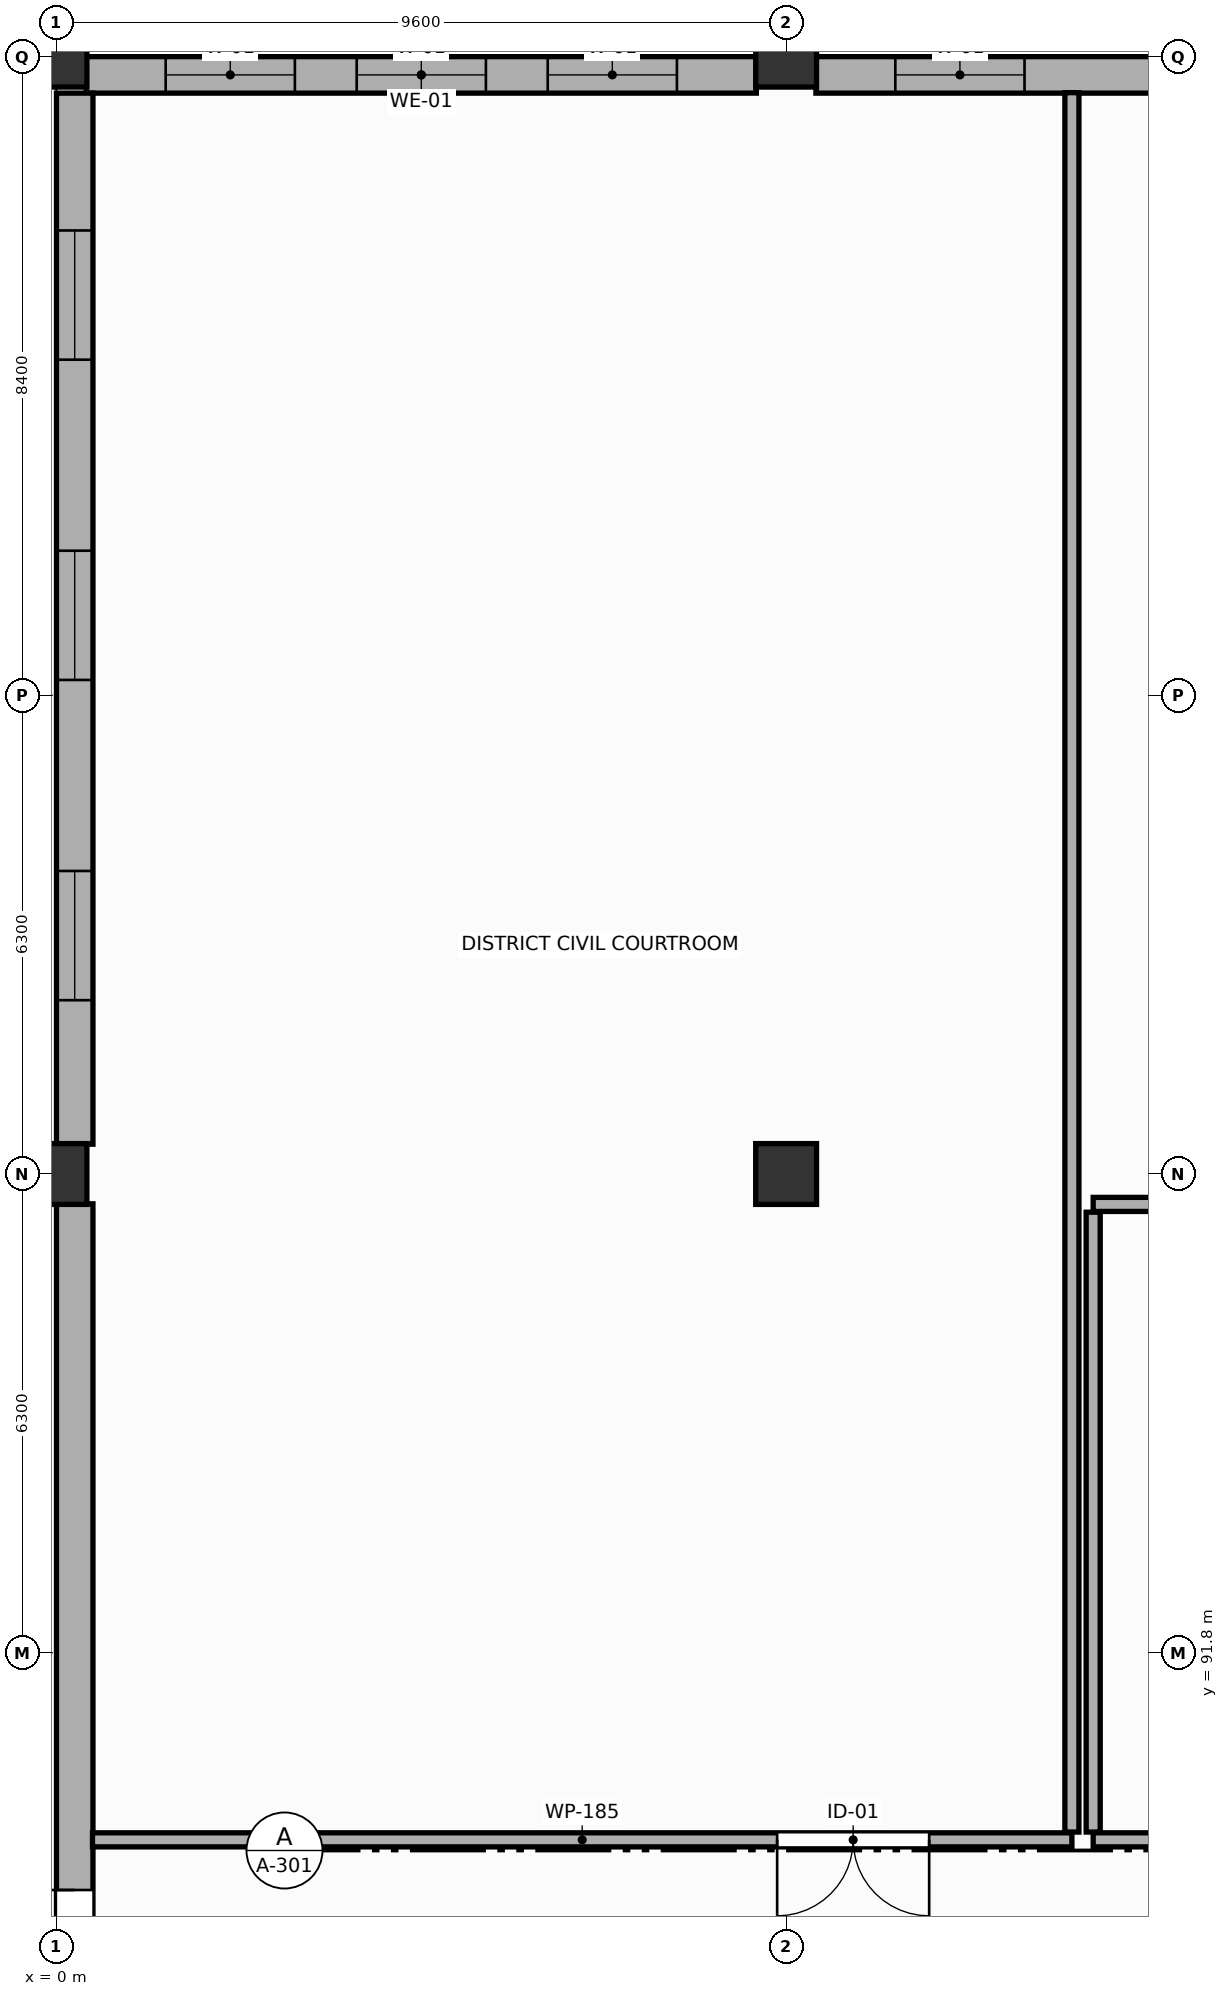
"""IFC4 building model, lengths in metres.
Left out: names, types, materials, properties, quantities, classifications, styles, units other than length and angle.
Written with IfcOpenShell. Run it as: python <this file> out.ifc"""

import sys

from ifc_helpers import new_model, si_unit, direction, frame, frame_2d, origin, origin_2d, place, context, subcontext, project, spatial, rectangle, extrude, element, fill, save


model = new_model("IFC4")
c1 = context("Model", 3, precision=1e-05, world=origin(), true_north=direction((0.0, 1.0)))
c2 = subcontext(c1, "Body", "Model", "MODEL_VIEW")
j1 = project(units=[si_unit("LENGTHUNIT", "METRE"), si_unit("PLANEANGLEUNIT", "RADIAN")], contexts=[c1])
p1 = place(None, origin())
s1 = spatial("IfcSite", under=j1, at=p1, CompositionType="ELEMENT")
p2 = place(p1, origin())
s2 = spatial("IfcBuilding", under=s1, at=p2, CompositionType="ELEMENT")
p3 = place(p2, origin())
s3 = spatial("IfcBuildingStorey", under=s2, at=p3, CompositionType="ELEMENT", Elevation=0.0)
for number, where, z_axis, x_axis in (
    (1, (0.0, 98.1, 0.0), (0.0, 0.0, 1.0), (1.0, 0.0, 0.0)),
    (2, (0.0, 112.8, 0.0), (0.0, 0.0, 1.0), (1.0, 0.0, 0.0)),
    (3, (9.6, 98.1, 0.0), (0.0, 0.0, 1.0), (1.0, 0.0, 0.0)),
    (4, (9.6, 112.8, 0.0), (0.0, 0.0, 1.0), (1.0, 0.0, 0.0)),
):
    element("IfcColumn", number, at=place(p3, frame(where, z_axis=z_axis, x_axis=x_axis)), inside=s3, PredefinedType="COLUMN", context=c2, shape_type="SweptSolid", body=[
        extrude(rectangle(XDim=0.8, YDim=0.8, at=origin_2d()), origin(), (0.0, 0.0, 1.0), 5.4),
    ])
p4 = place(p3, frame((0.392, 112.56, 0.0), z_axis=(0.0, 0.0, 1.0), x_axis=(1.0, 0.0, 0.0)))
e5 = element("IfcWall", 5, at=p4, inside=s3, PredefinedType="STANDARD", context=c2, shape_type="SweptSolid", body=[
    extrude(rectangle(XDim=8.816, YDim=0.48, at=frame_2d((4.408, 0.0))), origin(), (0.0, 0.0, 1.0), 4.18),
])
p5 = place(p4, frame((1.045, 0.0, 0.85)))
e6 = element("IfcOpeningElement", 6, at=p5, cuts=e5, PredefinedType="OPENING", context=c2, shape_type="SweptSolid", body=[
    extrude(rectangle(XDim=1.7, YDim=2.3, at=frame_2d((0.85, 1.15))), frame((0.0, 0.25, 0.0), z_axis=(0.0, -1.0, 0.0), x_axis=(1.0, 0.0, 0.0)), (0.0, 0.0, 1.0), 0.5),
])
p6 = place(p4, frame((3.558, 0.0, 0.85)))
e7 = element("IfcOpeningElement", 7, at=p6, cuts=e5, PredefinedType="OPENING", context=c2, shape_type="SweptSolid", body=[
    extrude(rectangle(XDim=1.7, YDim=2.3, at=frame_2d((0.85, 1.15))), frame((0.0, 0.25, 0.0), z_axis=(0.0, -1.0, 0.0), x_axis=(1.0, 0.0, 0.0)), (0.0, 0.0, 1.0), 0.5),
])
p7 = place(p4, frame((6.071, 0.0, 0.85)))
e8 = element("IfcOpeningElement", 8, at=p7, cuts=e5, PredefinedType="OPENING", context=c2, shape_type="SweptSolid", body=[
    extrude(rectangle(XDim=1.7, YDim=2.3, at=frame_2d((0.85, 1.15))), frame((0.0, 0.25, 0.0), z_axis=(0.0, -1.0, 0.0), x_axis=(1.0, 0.0, 0.0)), (0.0, 0.0, 1.0), 0.5),
])
p8 = place(p3, frame((9.992, 112.56, 0.0), z_axis=(0.0, 0.0, 1.0), x_axis=(1.0, 0.0, 0.0)))
e9 = element("IfcWall", 9, at=p8, inside=s3, PredefinedType="STANDARD", context=c2, shape_type="SweptSolid", body=[
    extrude(rectangle(XDim=8.821, YDim=0.48, at=frame_2d((4.411, 0.0))), origin(), (0.0, 0.0, 1.0), 4.18),
])
p9 = place(p8, frame((1.045, 0.0, 0.85)))
e10 = element("IfcOpeningElement", 10, at=p9, cuts=e9, PredefinedType="OPENING", context=c2, shape_type="SweptSolid", body=[
    extrude(rectangle(XDim=1.7, YDim=2.3, at=frame_2d((0.85, 1.15))), frame((0.0, 0.25, 0.0), z_axis=(0.0, -1.0, 0.0), x_axis=(1.0, 0.0, 0.0)), (0.0, 0.0, 1.0), 0.5),
])
p10 = place(p8, frame((6.071, 0.0, 0.85)))
e11 = element("IfcOpeningElement", 11, at=p10, cuts=e9, PredefinedType="OPENING", context=c2, shape_type="SweptSolid", body=[
    extrude(rectangle(XDim=1.7, YDim=2.3, at=frame_2d((0.85, 1.15))), frame((0.0, 0.25, 0.0), z_axis=(0.0, -1.0, 0.0), x_axis=(1.0, 0.0, 0.0)), (0.0, 0.0, 1.0), 0.5),
])
p11 = place(p3, frame((0.24, 85.892, 0.0), z_axis=(0.0, 0.0, 1.0), x_axis=(0.0, 1.0, 0.0)))
e12 = element("IfcWall", 12, at=p11, inside=s3, PredefinedType="STANDARD", context=c2, shape_type="SweptSolid", body=[
    extrude(rectangle(XDim=11.816, YDim=0.48, at=frame_2d((5.908, 0.0))), origin(), (0.0, 0.0, 1.0), 4.18),
])
p12 = place(p11, frame((0.988, 0.0, 0.0)))
e13 = element("IfcOpeningElement", 13, at=p12, cuts=e12, PredefinedType="OPENING", context=c2, shape_type="SweptSolid", body=[
    extrude(rectangle(XDim=1.8, YDim=2.25, at=frame_2d((0.9, 1.125))), frame((0.0, 0.25, 0.0), z_axis=(0.0, -1.0, 0.0), x_axis=(1.0, 0.0, 0.0)), (0.0, 0.0, 1.0), 0.5),
])
p13 = place(p3, frame((0.24, 98.492, 0.0), z_axis=(0.0, 0.0, 1.0), x_axis=(0.0, 1.0, 0.0)))
e14 = element("IfcWall", 14, at=p13, inside=s3, PredefinedType="STANDARD", context=c2, shape_type="SweptSolid", body=[
    extrude(rectangle(XDim=13.828, YDim=0.48, at=frame_2d((6.914, 0.0))), origin(), (0.0, 0.0, 1.0), 4.18),
])
p14 = place(p13, frame((1.895, 0.0, 0.85)))
e15 = element("IfcOpeningElement", 15, at=p14, cuts=e14, PredefinedType="OPENING", context=c2, shape_type="SweptSolid", body=[
    extrude(rectangle(XDim=1.7, YDim=2.3, at=frame_2d((0.85, 1.15))), frame((0.0, 0.25, 0.0), z_axis=(0.0, -1.0, 0.0), x_axis=(1.0, 0.0, 0.0)), (0.0, 0.0, 1.0), 0.5),
])
p15 = place(p13, frame((6.108, 0.0, 0.85)))
e16 = element("IfcOpeningElement", 16, at=p15, cuts=e14, PredefinedType="OPENING", context=c2, shape_type="SweptSolid", body=[
    extrude(rectangle(XDim=1.7, YDim=2.3, at=frame_2d((0.85, 1.15))), frame((0.0, 0.25, 0.0), z_axis=(0.0, -1.0, 0.0), x_axis=(1.0, 0.0, 0.0)), (0.0, 0.0, 1.0), 0.5),
])
p16 = place(p13, frame((10.321, 0.0, 0.85)))
e17 = element("IfcOpeningElement", 17, at=p16, cuts=e14, PredefinedType="OPENING", context=c2, shape_type="SweptSolid", body=[
    extrude(rectangle(XDim=1.7, YDim=2.3, at=frame_2d((0.85, 1.15))), frame((0.0, 0.25, 0.0), z_axis=(0.0, -1.0, 0.0), x_axis=(1.0, 0.0, 0.0)), (0.0, 0.0, 1.0), 0.5),
])
p17 = place(p3, frame((13.36, 89.34, 0.0), z_axis=(0.0, 0.0, 1.0), x_axis=(-1.0, 0.0, 0.0)))
e18 = element("IfcWall", 18, at=p17, inside=s3, PredefinedType="PARTITIONING", context=c2, shape_type="SweptSolid", body=[
    extrude(rectangle(XDim=12.886, YDim=0.185, at=frame_2d((6.443, 0.0))), origin(), (0.0, 0.0, 1.0), 4.23),
])
p18 = place(p17, frame((1.878, 0.0, 0.0)))
e19 = element("IfcOpeningElement", 19, at=p18, cuts=e18, PredefinedType="OPENING", context=c2, shape_type="SweptSolid", body=[
    extrude(rectangle(XDim=2.0, YDim=2.5, at=frame_2d((1.0, 1.25))), frame((0.0, 0.103, 0.0), z_axis=(0.0, -1.0, 0.0), x_axis=(1.0, 0.0, 0.0)), (0.0, 0.0, 1.0), 0.205),
])
p19 = place(p3, frame((13.36, 112.326, 0.0), z_axis=(0.0, 0.0, 1.0), x_axis=(0.0, -1.0, 0.0)))
e20 = element("IfcWall", 20, at=p19, inside=s3, PredefinedType="PARTITIONING", context=c2, shape_type="SweptSolid", body=[
    extrude(rectangle(XDim=22.884, YDim=0.185, at=frame_2d((11.442, 0.0))), origin(), (0.0, 0.0, 1.0), 4.33),
])
p20 = place(p3, frame((13.64, 97.7, 0.0), z_axis=(0.0, 0.0, 1.0), x_axis=(1.0, 0.0, 0.0)))
e21 = element("IfcWall", 21, at=p20, inside=s3, PredefinedType="PARTITIONING", context=c2, shape_type="SweptSolid", body=[
    extrude(rectangle(XDim=12.42, YDim=0.185, at=frame_2d((6.21, 0.0))), origin(), (0.0, 0.0, 1.0), 4.18),
])
p21 = place(p3, frame((26.06, 89.34, 0.0), z_axis=(0.0, 0.0, 1.0), x_axis=(-1.0, 0.0, 0.0)))
e22 = element("IfcWall", 22, at=p21, inside=s3, PredefinedType="PARTITIONING", context=c2, shape_type="SweptSolid", body=[
    extrude(rectangle(XDim=12.42, YDim=0.185, at=frame_2d((6.21, 0.0))), origin(), (0.0, 0.0, 1.0), 4.23),
])
p22 = place(p21, frame((1.808, 0.0, 0.0)))
e23 = element("IfcOpeningElement", 23, at=p22, cuts=e22, PredefinedType="OPENING", context=c2, shape_type="SweptSolid", body=[
    extrude(rectangle(XDim=2.0, YDim=2.5, at=frame_2d((1.0, 1.25))), frame((0.0, 0.103, 0.0), z_axis=(0.0, -1.0, 0.0), x_axis=(1.0, 0.0, 0.0)), (0.0, 0.0, 1.0), 0.205),
])
p23 = place(p3, frame((13.64, 89.442, 0.0), z_axis=(0.0, 0.0, 1.0), x_axis=(0.0, 1.0, 0.0)))
e24 = element("IfcWall", 24, at=p23, inside=s3, PredefinedType="PARTITIONING", context=c2, shape_type="SweptSolid", body=[
    extrude(rectangle(XDim=8.155, YDim=0.185, at=frame_2d((4.078, 0.0))), origin(), (0.0, 0.0, 1.0), 4.48),
])
p24 = place(p5, origin())
e25 = element("IfcWindow", 25, at=p24, inside=s3, PartitioningType="SINGLE_PANEL", PredefinedType="WINDOW", context=c2, shape_type="SweptSolid", body=[
    extrude(rectangle(XDim=1.7, YDim=2.3, at=frame_2d((0.85, 1.15))), frame((0.0, 0.03, 0.0), z_axis=(0.0, -1.0, 0.0), x_axis=(1.0, 0.0, 0.0)), (0.0, 0.0, 1.0), 0.06),
])
fill(e6, e25)
p25 = place(p6, origin())
e26 = element("IfcWindow", 26, at=p25, inside=s3, PartitioningType="SINGLE_PANEL", PredefinedType="WINDOW", context=c2, shape_type="SweptSolid", body=[
    extrude(rectangle(XDim=1.7, YDim=2.3, at=frame_2d((0.85, 1.15))), frame((0.0, 0.03, 0.0), z_axis=(0.0, -1.0, 0.0), x_axis=(1.0, 0.0, 0.0)), (0.0, 0.0, 1.0), 0.06),
])
fill(e7, e26)
p26 = place(p7, origin())
e27 = element("IfcWindow", 27, at=p26, inside=s3, PartitioningType="SINGLE_PANEL", PredefinedType="WINDOW", context=c2, shape_type="SweptSolid", body=[
    extrude(rectangle(XDim=1.7, YDim=2.3, at=frame_2d((0.85, 1.15))), frame((0.0, 0.03, 0.0), z_axis=(0.0, -1.0, 0.0), x_axis=(1.0, 0.0, 0.0)), (0.0, 0.0, 1.0), 0.06),
])
fill(e8, e27)
p27 = place(p9, origin())
e28 = element("IfcWindow", 28, at=p27, inside=s3, PartitioningType="SINGLE_PANEL", PredefinedType="WINDOW", context=c2, shape_type="SweptSolid", body=[
    extrude(rectangle(XDim=1.7, YDim=2.3, at=frame_2d((0.85, 1.15))), frame((0.0, 0.03, 0.0), z_axis=(0.0, -1.0, 0.0), x_axis=(1.0, 0.0, 0.0)), (0.0, 0.0, 1.0), 0.06),
])
fill(e10, e28)
p28 = place(p12, origin())
e29 = element("IfcDoor", 29, at=p28, inside=s3, OperationType="DOUBLE_DOOR_SINGLE_SWING", PredefinedType="DOOR", context=c2, shape_type="SweptSolid", body=[
    extrude(rectangle(XDim=1.8, YDim=2.25, at=frame_2d((0.9, 1.125))), frame((0.0, 0.025, 0.0), z_axis=(0.0, -1.0, 0.0), x_axis=(1.0, 0.0, 0.0)), (0.0, 0.0, 1.0), 0.05),
])
fill(e13, e29)
p29 = place(p14, origin())
e30 = element("IfcWindow", 30, at=p29, inside=s3, PartitioningType="SINGLE_PANEL", PredefinedType="WINDOW", context=c2, shape_type="SweptSolid", body=[
    extrude(rectangle(XDim=1.7, YDim=2.3, at=frame_2d((0.85, 1.15))), frame((0.0, 0.03, 0.0), z_axis=(0.0, -1.0, 0.0), x_axis=(1.0, 0.0, 0.0)), (0.0, 0.0, 1.0), 0.06),
])
fill(e15, e30)
p30 = place(p15, origin())
e31 = element("IfcWindow", 31, at=p30, inside=s3, PartitioningType="SINGLE_PANEL", PredefinedType="WINDOW", context=c2, shape_type="SweptSolid", body=[
    extrude(rectangle(XDim=1.7, YDim=2.3, at=frame_2d((0.85, 1.15))), frame((0.0, 0.03, 0.0), z_axis=(0.0, -1.0, 0.0), x_axis=(1.0, 0.0, 0.0)), (0.0, 0.0, 1.0), 0.06),
])
fill(e16, e31)
p31 = place(p16, origin())
e32 = element("IfcWindow", 32, at=p31, inside=s3, PartitioningType="SINGLE_PANEL", PredefinedType="WINDOW", context=c2, shape_type="SweptSolid", body=[
    extrude(rectangle(XDim=1.7, YDim=2.3, at=frame_2d((0.85, 1.15))), frame((0.0, 0.03, 0.0), z_axis=(0.0, -1.0, 0.0), x_axis=(1.0, 0.0, 0.0)), (0.0, 0.0, 1.0), 0.06),
])
fill(e17, e32)
p32 = place(p18, origin())
e33 = element("IfcDoor", 33, at=p32, inside=s3, OperationType="DOUBLE_DOOR_SINGLE_SWING", PredefinedType="DOOR", context=c2, shape_type="SweptSolid", body=[
    extrude(rectangle(XDim=2.0, YDim=2.5, at=frame_2d((1.0, 1.25))), frame((0.0, 0.025, 0.0), z_axis=(0.0, -1.0, 0.0), x_axis=(1.0, 0.0, 0.0)), (0.0, 0.0, 1.0), 0.05),
])
fill(e19, e33)
save(model, sys.argv[1])
